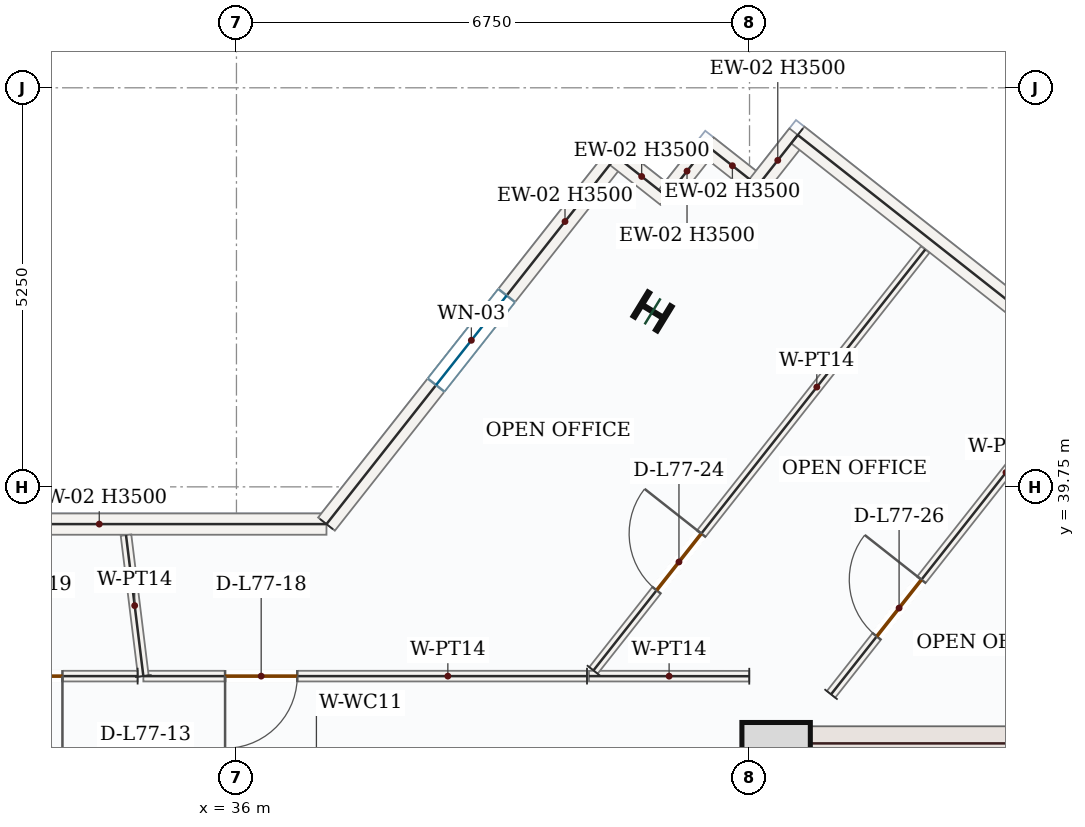
"""IFC4 building model, lengths in metres.
Left out: names, types, materials, properties, quantities, classifications, styles, units other than length and angle.
Written with IfcOpenShell. Run it as: python <this file> out.ifc"""

import sys

from ifc_helpers import new_model, si_unit, direction, frame, frame_2d, origin, origin_2d, place, context, subcontext, project, spatial, rectangle, i_section, extrude, source, transform, mapped, element, fill, save


model = new_model("IFC4")
c1 = context("Model", 3, precision=1e-05, world=origin(), true_north=direction((0.0, 1.0)))
c2 = subcontext(c1, "Body", "Model", "MODEL_VIEW")
j1 = project(units=[si_unit("LENGTHUNIT", "METRE"), si_unit("PLANEANGLEUNIT", "RADIAN")], contexts=[c1])
p1 = place(None, origin())
s1 = spatial("IfcSite", under=j1, at=p1, CompositionType="ELEMENT")
p2 = place(p1, origin())
s2 = spatial("IfcBuilding", under=s1, at=p2, CompositionType="ELEMENT")
p3 = place(p2, frame((0.0, 0.0, 319.8)))
s3 = spatial("IfcBuildingStorey", under=s2, at=p3, CompositionType="ELEMENT", Elevation=319.8)
p4 = place(p3, frame((42.975, 28.05, 0.0), z_axis=(0.0, 0.0, 1.0), x_axis=(0.0, 1.0, 0.0)))
e1 = element("IfcWall", 1, at=p4, inside=s3, PredefinedType="SHEAR", context=c2, shape_type="SweptSolid", body=[
    extrude(rectangle(XDim=8.55, YDim=0.45, at=frame_2d((4.275, 0.0))), origin(), (0.0, 0.0, 1.0), 3.5),
])
p5 = place(p4, frame((1.5, 0.0, 0.0)))
e2 = element("IfcOpeningElement", 2, at=p5, cuts=e1, PredefinedType="OPENING", context=c2, shape_type="SweptSolid", body=[
    extrude(rectangle(XDim=1.1, YDim=2.2, at=frame_2d((0.55, 1.1))), frame((0.0, 0.235, 0.0), z_axis=(0.0, -1.0, 0.0), x_axis=(1.0, 0.0, 0.0)), (0.0, 0.0, 1.0), 0.47),
])
m1 = source(origin(), c2, "Body", "SweptSolid", [
    extrude(rectangle(XDim=7.1, YDim=0.45, at=frame_2d((3.55, 0.0))), origin(), (0.0, 0.0, 1.0), 3.5),
])
p6 = place(p3, frame((43.2, 36.375, 0.0), z_axis=(0.0, 0.0, 1.0), x_axis=(1.0, 0.0, 0.0)))
e3 = element("IfcWall", 3, at=p6, inside=s3, PredefinedType="SHEAR", context=c2, shape_type="MappedRepresentation", body=[
    mapped(m1, transform((0.0, 0.0, 0.0), x_axis=(1.0, 0.0, 0.0), y_axis=(0.0, 1.0, 0.0), z_axis=(0.0, 0.0, 1.0), scale=1.0)),
])
m2 = source(origin(), c2, "Body", "SweptSolid", [
    extrude(rectangle(XDim=0.9, YDim=0.9, at=origin_2d()), origin(), (0.0, 0.0, 1.0), 3.75),
])
p7 = place(p3, frame((43.1, 36.2, 0.0), z_axis=(0.0, 0.0, 1.0), x_axis=(1.0, 0.0, 0.0)))
e4 = element("IfcColumn", 4, at=p7, inside=s3, PredefinedType="COLUMN", context=c2, shape_type="MappedRepresentation", body=[
    mapped(m2, transform((0.0, 0.0, 0.0), x_axis=(1.0, 0.0, 0.0), y_axis=(0.0, 1.0, 0.0), z_axis=(0.0, 0.0, 1.0), scale=1.0)),
])
m3 = source(origin(), c2, "Body", "SweptSolid", [
    extrude(i_section(OverallWidth=0.374, OverallDepth=0.372, WebThickness=0.016, FlangeThickness=0.026, FilletRadius=0.018, at=origin_2d()), origin(), (0.0, 0.0, 1.0), 3.75),
])
p8 = place(p3, frame((41.475, 42.058, 0.0), z_axis=(0.0, 0.0, 1.0), x_axis=(0.522498564716, 0.852640164354, 0.0)))
e5 = element("IfcColumn", 5, at=p8, inside=s3, PredefinedType="COLUMN", context=c2, shape_type="MappedRepresentation", body=[
    mapped(m3, transform((0.0, 0.0, 0.0), x_axis=(1.0, 0.0, 0.0), y_axis=(0.0, 1.0, 0.0), z_axis=(0.0, 0.0, 1.0), scale=1.0)),
])
m4 = source(origin(), c2, "Body", "SweptSolid", [
    extrude(rectangle(XDim=5.978, YDim=0.28, at=frame_2d((2.989, 0.0))), origin(), (0.0, 0.0, 1.0), 3.5),
])
p9 = place(p3, frame((31.206, 39.26, 0.0), z_axis=(0.0, 0.0, 1.0), x_axis=(1.0, 0.0, 0.0)))
e6 = element("IfcWall", 6, at=p9, inside=s3, PredefinedType="SOLIDWALL", context=c2, shape_type="MappedRepresentation", body=[
    mapped(m4, transform((0.0, 0.0, 0.0), x_axis=(1.0, 0.0, 0.0), y_axis=(0.0, 1.0, 0.0), z_axis=(0.0, 0.0, 1.0), scale=1.0)),
])
p10 = place(p3, frame((37.184, 39.26, 0.0), z_axis=(0.0, 0.0, 1.0), x_axis=(0.619100474058, 0.78531178714, 0.0)))
e7 = element("IfcWall", 7, at=p10, inside=s3, PredefinedType="SOLIDWALL", context=c2, shape_type="SweptSolid", body=[
    extrude(rectangle(XDim=6.159, YDim=0.28, at=frame_2d((3.08, 0.0))), origin(), (0.0, 0.0, 1.0), 3.5),
])
p11 = place(p10, frame((2.329, 0.0, 0.85)))
e8 = element("IfcOpeningElement", 8, at=p11, cuts=e7, PredefinedType="OPENING", context=c2, shape_type="SweptSolid", body=[
    extrude(rectangle(XDim=1.5, YDim=1.5, at=frame_2d((0.75, 0.75))), frame((0.0, 0.15, 0.0), z_axis=(0.0, -1.0, 0.0), x_axis=(1.0, 0.0, 0.0)), (0.0, 0.0, 1.0), 0.3),
])
m5 = source(origin(), c2, "Body", "SweptSolid", [
    extrude(rectangle(XDim=0.85, YDim=0.28, at=frame_2d((0.425, 0.0))), origin(), (0.0, 0.0, 1.0), 3.5),
])
p12 = place(p3, frame((40.997, 44.097, 0.0), z_axis=(0.0, 0.0, 1.0), x_axis=(0.785220826193, -0.619215838066, 0.0)))
e9 = element("IfcWall", 9, at=p12, inside=s3, PredefinedType="SOLIDWALL", context=c2, shape_type="MappedRepresentation", body=[
    mapped(m5, transform((0.0, 0.0, 0.0), x_axis=(1.0, 0.0, 0.0), y_axis=(0.0, 1.0, 0.0), z_axis=(0.0, 0.0, 1.0), scale=1.0)),
])
m6 = source(origin(), c2, "Body", "SweptSolid", [
    extrude(rectangle(XDim=0.85, YDim=0.28, at=frame_2d((0.425, 0.0))), origin(), (0.0, 0.0, 1.0), 3.5),
])
for number, where, z_axis, x_axis in (
    (10, (41.665, 43.57, 0.0), (0.0, 0.0, 1.0), (0.619, 0.785, 0.0)),
    (11, (42.191, 44.238, 0.0), (0.0, 0.0, 1.0), (0.785, -0.619, 0.0)),
):
    element("IfcWall", number, at=place(p3, frame(where, z_axis=z_axis, x_axis=x_axis)), inside=s3, PredefinedType="SOLIDWALL", context=c2, shape_type="MappedRepresentation", body=[
        mapped(m6, transform((0.0, 0.0, 0.0), x_axis=(1.0, 0.0, 0.0), y_axis=(0.0, 1.0, 0.0), z_axis=(0.0, 0.0, 1.0), scale=1.0)),
    ])
p13 = place(p3, frame((42.858, 43.712, 0.0), z_axis=(0.0, 0.0, 1.0), x_axis=(0.619215838066, 0.785220826193, 0.0)))
e12 = element("IfcWall", 12, at=p13, inside=s3, PredefinedType="SOLIDWALL", context=c2, shape_type="MappedRepresentation", body=[
    mapped(m5, transform((0.0, 0.0, 0.0), x_axis=(1.0, 0.0, 0.0), y_axis=(0.0, 1.0, 0.0), z_axis=(0.0, 0.0, 1.0), scale=1.0)),
])
m7 = source(origin(), c2, "Body", "SweptSolid", [
    extrude(rectangle(XDim=9.92, YDim=0.28, at=frame_2d((4.96, 0.0))), origin(), (0.0, 0.0, 1.0), 3.5),
])
p14 = place(p3, frame((43.385, 44.379, 0.0), z_axis=(0.0, 0.0, 1.0), x_axis=(0.785317257435, -0.619093535077, 0.0)))
e13 = element("IfcWall", 13, at=p14, inside=s3, PredefinedType="SOLIDWALL", context=c2, shape_type="MappedRepresentation", body=[
    mapped(m7, transform((0.0, 0.0, 0.0), x_axis=(1.0, 0.0, 0.0), y_axis=(0.0, 1.0, 0.0), z_axis=(0.0, 0.0, 1.0), scale=1.0)),
])
p15 = place(p3, frame((43.823, 37.02, 0.0), z_axis=(0.0, 0.0, 1.0), x_axis=(0.619105408422, 0.785307897109, 0.0)))
e14 = element("IfcWall", 14, at=p15, inside=s3, PredefinedType="PARTITIONING", context=c2, shape_type="SweptSolid", body=[
    extrude(rectangle(XDim=5.363, YDim=0.14, at=frame_2d((2.682, 0.0))), origin(), (0.0, 0.0, 1.0), 3.5),
])
p16 = place(p15, frame((0.971, 0.0, 0.0)))
e15 = element("IfcOpeningElement", 15, at=p16, cuts=e14, PredefinedType="OPENING", context=c2, shape_type="SweptSolid", body=[
    extrude(rectangle(XDim=0.95, YDim=2.15, at=frame_2d((0.475, 1.075))), frame((0.0, 0.08, 0.0), z_axis=(0.0, -1.0, 0.0), x_axis=(1.0, 0.0, 0.0)), (0.0, 0.0, 1.0), 0.16),
])
m8 = source(origin(), c2, "Body", "SweptSolid", [
    extrude(rectangle(XDim=2.109, YDim=0.14, at=frame_2d((1.054, 0.0))), origin(), (0.0, 0.0, 1.0), 3.5),
])
p17 = place(p3, frame((42.747, 37.259, 0.0), z_axis=(0.0, 0.0, 1.0), x_axis=(-0.999999832474, 0.000578837597, 0.0)))
e16 = element("IfcWall", 16, at=p17, inside=s3, PredefinedType="PARTITIONING", context=c2, shape_type="MappedRepresentation", body=[
    mapped(m8, transform((0.0, 0.0, 0.0), x_axis=(1.0, 0.0, 0.0), y_axis=(0.0, 1.0, 0.0), z_axis=(0.0, 0.0, 1.0), scale=1.0)),
])
p18 = place(p3, frame((40.697, 37.335, 0.0), z_axis=(0.0, 0.0, 1.0), x_axis=(0.619105259882, 0.785308014213, 0.0)))
e17 = element("IfcWall", 17, at=p18, inside=s3, PredefinedType="PARTITIONING", context=c2, shape_type="SweptSolid", body=[
    extrude(rectangle(XDim=7.051, YDim=0.14, at=frame_2d((3.525, 0.0))), origin(), (0.0, 0.0, 1.0), 3.5),
])
p19 = place(p18, frame((1.342, 0.0, 0.0)))
e18 = element("IfcOpeningElement", 18, at=p19, cuts=e17, PredefinedType="OPENING", context=c2, shape_type="SweptSolid", body=[
    extrude(rectangle(XDim=0.95, YDim=2.15, at=frame_2d((0.475, 1.075))), frame((0.0, 0.08, 0.0), z_axis=(0.0, -1.0, 0.0), x_axis=(1.0, 0.0, 0.0)), (0.0, 0.0, 1.0), 0.16),
])
p20 = place(p3, frame((40.612, 37.26, 0.0), z_axis=(0.0, 0.0, 1.0), x_axis=(-1.0, 0.0, 0.0)))
e19 = element("IfcWall", 19, at=p20, inside=s3, PredefinedType="PARTITIONING", context=c2, shape_type="SweptSolid", body=[
    extrude(rectangle(XDim=5.837, YDim=0.14, at=frame_2d((2.918, 0.0))), origin(), (0.0, 0.0, 1.0), 3.5),
])
p21 = place(p20, frame((3.812, 0.0, 0.0)))
e20 = element("IfcOpeningElement", 20, at=p21, cuts=e19, PredefinedType="OPENING", context=c2, shape_type="SweptSolid", body=[
    extrude(rectangle(XDim=0.95, YDim=2.15, at=frame_2d((0.475, 1.075))), frame((0.0, 0.08, 0.0), z_axis=(0.0, -1.0, 0.0), x_axis=(1.0, 0.0, 0.0)), (0.0, 0.0, 1.0), 0.16),
])
m9 = source(origin(), c2, "Body", "SweptSolid", [
    extrude(rectangle(XDim=1.869, YDim=0.14, at=frame_2d((0.934, 0.0))), origin(), (0.0, 0.0, 1.0), 3.5),
])
p22 = place(p3, frame((34.775, 37.26, 0.0), z_axis=(0.0, 0.0, 1.0), x_axis=(-0.122153221409, 0.992511254596, 0.0)))
e21 = element("IfcWall", 21, at=p22, inside=s3, PredefinedType="PARTITIONING", context=c2, shape_type="MappedRepresentation", body=[
    mapped(m9, transform((0.0, 0.0, 0.0), x_axis=(1.0, 0.0, 0.0), y_axis=(0.0, 1.0, 0.0), z_axis=(0.0, 0.0, 1.0), scale=1.0)),
])
p23 = place(p3, frame((34.7, 37.26, 0.0), z_axis=(0.0, 0.0, 1.0), x_axis=(-0.999999995981, -8.9657955e-05, 0.0)))
e22 = element("IfcWall", 22, at=p23, inside=s3, PredefinedType="PARTITIONING", context=c2, shape_type="SweptSolid", body=[
    extrude(rectangle(XDim=5.446, YDim=0.14, at=frame_2d((2.723, 0.0))), origin(), (0.0, 0.0, 1.0), 3.5),
])
p24 = place(p23, frame((0.989, 0.0, 0.0)))
e23 = element("IfcOpeningElement", 23, at=p24, cuts=e22, PredefinedType="OPENING", context=c2, shape_type="SweptSolid", body=[
    extrude(rectangle(XDim=0.95, YDim=2.15, at=frame_2d((0.475, 1.075))), frame((0.0, 0.08, 0.0), z_axis=(0.0, -1.0, 0.0), x_axis=(1.0, 0.0, 0.0)), (0.0, 0.0, 1.0), 0.16),
])
m10 = source(origin(), c2, "Body", "SweptSolid", [
    extrude(rectangle(XDim=1.5, YDim=1.5, at=frame_2d((0.75, 0.75))), frame((0.0, 0.03, 0.0), z_axis=(0.0, -1.0, 0.0), x_axis=(1.0, 0.0, 0.0)), (0.0, 0.0, 1.0), 0.06),
])
p25 = place(p11, origin())
e24 = element("IfcWindow", 24, at=p25, inside=s3, PartitioningType="SINGLE_PANEL", PredefinedType="WINDOW", context=c2, shape_type="MappedRepresentation", body=[
    mapped(m10, transform((0.0, 0.0, 0.0), x_axis=(1.0, 0.0, 0.0), y_axis=(0.0, 1.0, 0.0), z_axis=(0.0, 0.0, 1.0), scale=1.0)),
])
fill(e8, e24)
m11 = source(origin(), c2, "Body", "SweptSolid", [
    extrude(rectangle(XDim=0.95, YDim=2.15, at=frame_2d((0.475, 1.075))), frame((0.0, 0.025, 0.0), z_axis=(0.0, -1.0, 0.0), x_axis=(1.0, 0.0, 0.0)), (0.0, 0.0, 1.0), 0.05),
])
p26 = place(p21, origin())
e25 = element("IfcDoor", 25, at=p26, inside=s3, OperationType="SINGLE_SWING_RIGHT", PredefinedType="DOOR", context=c2, shape_type="MappedRepresentation", body=[
    mapped(m11, transform((0.0, 0.0, 0.0), x_axis=(1.0, 0.0, 0.0), y_axis=(0.0, 1.0, 0.0), z_axis=(0.0, 0.0, 1.0), scale=1.0)),
])
fill(e20, e25)
p27 = place(p24, origin())
e26 = element("IfcDoor", 26, at=p27, inside=s3, OperationType="SINGLE_SWING_LEFT", PredefinedType="DOOR", context=c2, shape_type="MappedRepresentation", body=[
    mapped(m11, transform((0.0, 0.0, 0.0), x_axis=(1.0, 0.0, 0.0), y_axis=(0.0, 1.0, 0.0), z_axis=(0.0, 0.0, 1.0), scale=1.0)),
])
fill(e23, e26)
p28 = place(p19, origin())
e27 = element("IfcDoor", 27, at=p28, inside=s3, OperationType="SINGLE_SWING_RIGHT", PredefinedType="DOOR", context=c2, shape_type="MappedRepresentation", body=[
    mapped(m11, transform((0.0, 0.0, 0.0), x_axis=(1.0, 0.0, 0.0), y_axis=(0.0, 1.0, 0.0), z_axis=(0.0, 0.0, 1.0), scale=1.0)),
])
fill(e18, e27)
p29 = place(p16, origin())
e28 = element("IfcDoor", 28, at=p29, inside=s3, OperationType="SINGLE_SWING_RIGHT", PredefinedType="DOOR", context=c2, shape_type="MappedRepresentation", body=[
    mapped(m11, transform((0.0, 0.0, 0.0), x_axis=(1.0, 0.0, 0.0), y_axis=(0.0, 1.0, 0.0), z_axis=(0.0, 0.0, 1.0), scale=1.0)),
])
fill(e15, e28)
save(model, sys.argv[1])
